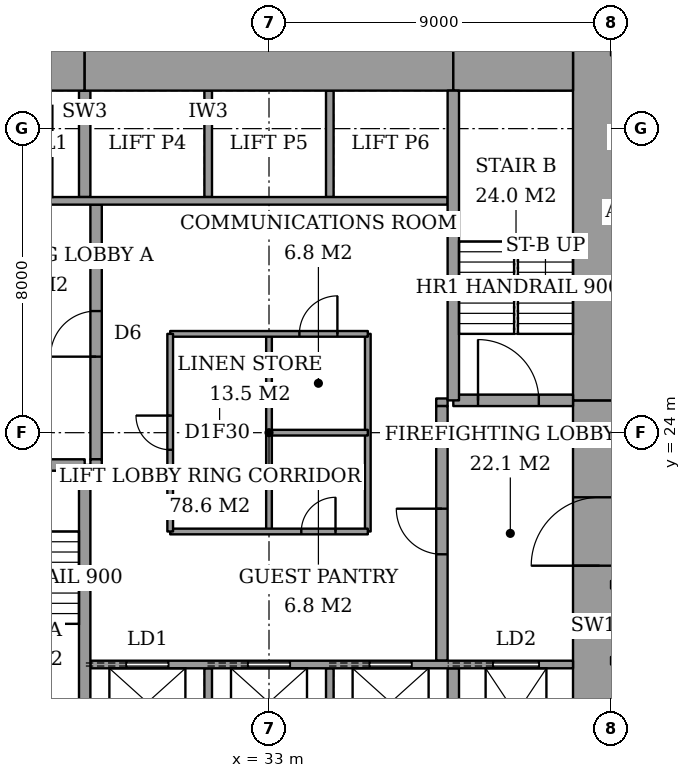
"""IFC4 building model, lengths in metres.
Left out: names, types, materials, properties, quantities, classifications, styles, units other than length and angle.
Written with IfcOpenShell. Run it as: python <this file> out.ifc"""

import sys

from ifc_helpers import new_model, si_unit, direction, frame, frame_2d, origin, place, context, subcontext, project, spatial, rectangle, extrude, element, fill, save


model = new_model("IFC4")
c1 = context("Model", 3, precision=1e-05, world=origin(), true_north=direction((0.0, 1.0)))
c2 = subcontext(c1, "Body", "Model", "MODEL_VIEW")
j1 = project(units=[si_unit("LENGTHUNIT", "METRE"), si_unit("PLANEANGLEUNIT", "RADIAN")], contexts=[c1])
p1 = place(None, origin())
s1 = spatial("IfcSite", under=j1, at=p1, CompositionType="ELEMENT")
p2 = place(p1, origin())
s2 = spatial("IfcBuilding", under=s1, at=p2, CompositionType="ELEMENT")
p3 = place(p2, frame((0.0, 0.0, 132.2)))
s3 = spatial("IfcBuildingStorey", under=s2, at=p3, CompositionType="ELEMENT", Elevation=132.2)
p4 = place(p3, frame((25.0, 34.0, 0.0), z_axis=(0.0, 0.0, 1.0), x_axis=(1.0, 0.0, 0.0)))
e1 = element("IfcWall", 1, at=p4, inside=s3, PredefinedType="SHEAR", context=c2, shape_type="SweptSolid", body=[
    extrude(rectangle(XDim=3.15, YDim=2.0, at=frame_2d((1.575, 0.0))), origin(), (0.0, 0.0, 1.0), 3.6),
])
p5 = place(p3, frame((28.15, 34.0, 0.0), z_axis=(0.0, 0.0, 1.0), x_axis=(1.0, 0.0, 0.0)))
e2 = element("IfcWall", 2, at=p5, inside=s3, PredefinedType="SHEAR", context=c2, shape_type="SweptSolid", body=[
    extrude(rectangle(XDim=9.7, YDim=2.0, at=frame_2d((4.85, 0.0))), origin(), (0.0, 0.0, 1.0), 3.6),
])
p6 = place(p3, frame((37.85, 34.0, 0.0), z_axis=(0.0, 0.0, 1.0), x_axis=(1.0, 0.0, 0.0)))
e3 = element("IfcWall", 3, at=p6, inside=s3, PredefinedType="SHEAR", context=c2, shape_type="SweptSolid", body=[
    extrude(rectangle(XDim=3.15, YDim=2.0, at=frame_2d((1.575, 0.0))), origin(), (0.0, 0.0, 1.0), 3.6),
])
p7 = place(p3, frame((41.7, 13.0, 0.0), z_axis=(0.0, 0.0, 1.0), x_axis=(0.0, 1.0, 0.0)))
e4 = element("IfcWall", 4, at=p7, inside=s3, PredefinedType="SHEAR", context=c2, shape_type="SweptSolid", body=[
    extrude(rectangle(XDim=11.85, YDim=1.4, at=frame_2d((5.925, 0.0))), origin(), (0.0, 0.0, 1.0), 3.6),
])
p8 = place(p7, frame((7.5, 0.0, 0.0)))
e5 = element("IfcOpeningElement", 5, at=p8, cuts=e4, PredefinedType="OPENING", context=c2, shape_type="SweptSolid", body=[
    extrude(rectangle(XDim=1.8, YDim=2.4, at=frame_2d((0.9, 1.2))), frame((0.0, 0.71, 0.0), z_axis=(0.0, -1.0, 0.0), x_axis=(1.0, 0.0, 0.0)), (0.0, 0.0, 1.0), 1.42),
])
p9 = place(p3, frame((41.7, 24.85, 0.0), z_axis=(0.0, 0.0, 1.0), x_axis=(0.0, 1.0, 0.0)))
e6 = element("IfcWall", 6, at=p9, inside=s3, PredefinedType="SHEAR", context=c2, shape_type="SweptSolid", body=[
    extrude(rectangle(XDim=10.15, YDim=1.4, at=frame_2d((5.075, 0.0))), origin(), (0.0, 0.0, 1.0), 3.6),
])
p10 = place(p3, frame((28.15, 15.0, 0.0), z_axis=(0.0, 0.0, 1.0), x_axis=(0.0, 1.0, 0.0)))
e7 = element("IfcWall", 7, at=p10, inside=s3, PredefinedType="SHEAR", context=c2, shape_type="SweptSolid", body=[
    extrude(rectangle(XDim=8.15, YDim=0.3, at=frame_2d((4.075, 0.0))), origin(), (0.0, 0.0, 1.0), 3.6),
])
p11 = place(p3, frame((25.0, 23.15, 0.0), z_axis=(0.0, 0.0, 1.0), x_axis=(1.0, 0.0, 0.0)))
e8 = element("IfcWall", 8, at=p11, inside=s3, PredefinedType="SHEAR", context=c2, shape_type="SweptSolid", body=[
    extrude(rectangle(XDim=3.15, YDim=0.3, at=frame_2d((1.575, 0.0))), origin(), (0.0, 0.0, 1.0), 3.6),
])
p12 = place(p11, frame((0.3, 0.0, 0.0)))
e9 = element("IfcOpeningElement", 9, at=p12, cuts=e8, PredefinedType="OPENING", context=c2, shape_type="SweptSolid", body=[
    extrude(rectangle(XDim=1.6, YDim=2.1, at=frame_2d((0.8, 1.05))), frame((0.0, 0.16, 0.0), z_axis=(0.0, -1.0, 0.0), x_axis=(1.0, 0.0, 0.0)), (0.0, 0.0, 1.0), 0.32),
])
p13 = place(p3, frame((37.85, 24.85, 0.0), z_axis=(0.0, 0.0, 1.0), x_axis=(0.0, 1.0, 0.0)))
e10 = element("IfcWall", 10, at=p13, inside=s3, PredefinedType="SHEAR", context=c2, shape_type="SweptSolid", body=[
    extrude(rectangle(XDim=8.15, YDim=0.3, at=frame_2d((4.075, 0.0))), origin(), (0.0, 0.0, 1.0), 3.6),
])
p14 = place(p3, frame((37.85, 24.85, 0.0), z_axis=(0.0, 0.0, 1.0), x_axis=(1.0, 0.0, 0.0)))
e11 = element("IfcWall", 11, at=p14, inside=s3, PredefinedType="SHEAR", context=c2, shape_type="SweptSolid", body=[
    extrude(rectangle(XDim=3.15, YDim=0.3, at=frame_2d((1.575, 0.0))), origin(), (0.0, 0.0, 1.0), 3.6),
])
p15 = place(p14, frame((0.65, 0.0, 0.0)))
e12 = element("IfcOpeningElement", 12, at=p15, cuts=e11, PredefinedType="OPENING", context=c2, shape_type="SweptSolid", body=[
    extrude(rectangle(XDim=1.6, YDim=2.1, at=frame_2d((0.8, 1.05))), frame((0.0, 0.16, 0.0), z_axis=(0.0, -1.0, 0.0), x_axis=(1.0, 0.0, 0.0)), (0.0, 0.0, 1.0), 0.32),
])
p16 = place(p3, frame((28.45, 23.3, 0.0), z_axis=(0.0, 0.0, 1.0), x_axis=(0.0, 1.0, 0.0)))
e13 = element("IfcWall", 13, at=p16, inside=s3, PredefinedType="PARTITIONING", context=c2, shape_type="SweptSolid", body=[
    extrude(rectangle(XDim=6.7, YDim=0.3, at=frame_2d((3.35, 0.0))), origin(), (0.0, 0.0, 1.0), 3.6),
])
p17 = place(p16, frame((2.7, 0.0, 0.0)))
e14 = element("IfcOpeningElement", 14, at=p17, cuts=e13, PredefinedType="OPENING", context=c2, shape_type="SweptSolid", body=[
    extrude(rectangle(XDim=1.2, YDim=2.1, at=frame_2d((0.6, 1.05))), frame((0.0, 0.16, 0.0), z_axis=(0.0, -1.0, 0.0), x_axis=(1.0, 0.0, 0.0)), (0.0, 0.0, 1.0), 0.32),
])
p18 = place(p3, frame((37.55, 18.0, 0.0), z_axis=(0.0, 0.0, 1.0), x_axis=(0.0, 1.0, 0.0)))
e15 = element("IfcWall", 15, at=p18, inside=s3, PredefinedType="PARTITIONING", context=c2, shape_type="SweptSolid", body=[
    extrude(rectangle(XDim=6.7, YDim=0.3, at=frame_2d((3.35, 0.0))), origin(), (0.0, 0.0, 1.0), 3.6),
])
p19 = place(p18, frame((2.8, 0.0, 0.0)))
e16 = element("IfcOpeningElement", 16, at=p19, cuts=e15, PredefinedType="OPENING", context=c2, shape_type="SweptSolid", body=[
    extrude(rectangle(XDim=1.2, YDim=2.1, at=frame_2d((0.6, 1.05))), frame((0.0, 0.16, 0.0), z_axis=(0.0, -1.0, 0.0), x_axis=(1.0, 0.0, 0.0)), (0.0, 0.0, 1.0), 0.32),
])
p20 = place(p3, frame((28.3, 17.9, 0.0), z_axis=(0.0, 0.0, 1.0), x_axis=(1.0, 0.0, 0.0)))
e17 = element("IfcWall", 17, at=p20, inside=s3, PredefinedType="PARTITIONING", context=c2, shape_type="SweptSolid", body=[
    extrude(rectangle(XDim=12.7, YDim=0.2, at=frame_2d((6.35, 0.0))), origin(), (0.0, 0.0, 1.0), 3.6),
])
p21 = place(p20, frame((0.95, 0.0, 0.0)))
e18 = element("IfcOpeningElement", 18, at=p21, cuts=e17, PredefinedType="OPENING", context=c2, shape_type="SweptSolid", body=[
    extrude(rectangle(XDim=1.1, YDim=2.1, at=frame_2d((0.55, 1.05))), frame((0.0, 0.11, 0.0), z_axis=(0.0, -1.0, 0.0), x_axis=(1.0, 0.0, 0.0)), (0.0, 0.0, 1.0), 0.22),
])
p22 = place(p20, frame((4.15, 0.0, 0.0)))
e19 = element("IfcOpeningElement", 19, at=p22, cuts=e17, PredefinedType="OPENING", context=c2, shape_type="SweptSolid", body=[
    extrude(rectangle(XDim=1.1, YDim=2.1, at=frame_2d((0.55, 1.05))), frame((0.0, 0.11, 0.0), z_axis=(0.0, -1.0, 0.0), x_axis=(1.0, 0.0, 0.0)), (0.0, 0.0, 1.0), 0.22),
])
p23 = place(p20, frame((7.35, 0.0, 0.0)))
e20 = element("IfcOpeningElement", 20, at=p23, cuts=e17, PredefinedType="OPENING", context=c2, shape_type="SweptSolid", body=[
    extrude(rectangle(XDim=1.1, YDim=2.1, at=frame_2d((0.55, 1.05))), frame((0.0, 0.11, 0.0), z_axis=(0.0, -1.0, 0.0), x_axis=(1.0, 0.0, 0.0)), (0.0, 0.0, 1.0), 0.22),
])
p24 = place(p20, frame((10.6, 0.0, 0.0)))
e21 = element("IfcOpeningElement", 21, at=p24, cuts=e17, PredefinedType="OPENING", context=c2, shape_type="SweptSolid", body=[
    extrude(rectangle(XDim=1.2, YDim=2.1, at=frame_2d((0.6, 1.05))), frame((0.0, 0.11, 0.0), z_axis=(0.0, -1.0, 0.0), x_axis=(1.0, 0.0, 0.0)), (0.0, 0.0, 1.0), 0.22),
])
p25 = place(p3, frame((25.0, 30.1, 0.0), z_axis=(0.0, 0.0, 1.0), x_axis=(1.0, 0.0, 0.0)))
e22 = element("IfcWall", 22, at=p25, inside=s3, PredefinedType="PARTITIONING", context=c2, shape_type="SweptSolid", body=[
    extrude(rectangle(XDim=12.7, YDim=0.2, at=frame_2d((6.35, 0.0))), origin(), (0.0, 0.0, 1.0), 3.6),
])
p26 = place(p25, frame((0.9, 0.0, 0.0)))
e23 = element("IfcOpeningElement", 23, at=p26, cuts=e22, PredefinedType="OPENING", context=c2, shape_type="SweptSolid", body=[
    extrude(rectangle(XDim=1.2, YDim=2.1, at=frame_2d((0.6, 1.05))), frame((0.0, 0.11, 0.0), z_axis=(0.0, -1.0, 0.0), x_axis=(1.0, 0.0, 0.0)), (0.0, 0.0, 1.0), 0.22),
])
for number, where, z_axis, x_axis in (
    (24, (31.4, 15.0, 0.0), (0.0, 0.0, 1.0), (0.0, 1.0, 0.0)),
    (25, (34.6, 15.0, 0.0), (0.0, 0.0, 1.0), (0.0, 1.0, 0.0)),
):
    element("IfcWall", number, at=place(p3, frame(where, z_axis=z_axis, x_axis=x_axis)), inside=s3, PredefinedType="PARTITIONING", context=c2, shape_type="SweptSolid", body=[
        extrude(rectangle(XDim=2.8, YDim=0.2, at=frame_2d((1.4, 0.0))), origin(), (0.0, 0.0, 1.0), 3.6),
    ])
p27 = place(p3, frame((37.85, 15.0, 0.0), z_axis=(0.0, 0.0, 1.0), x_axis=(0.0, 1.0, 0.0)))
e26 = element("IfcWall", 26, at=p27, inside=s3, PredefinedType="SHEAR", context=c2, shape_type="SweptSolid", body=[
    extrude(rectangle(XDim=2.8, YDim=0.3, at=frame_2d((1.4, 0.0))), origin(), (0.0, 0.0, 1.0), 3.6),
])
for number, where, z_axis, x_axis in (
    (27, (31.4, 30.2, 0.0), (0.0, 0.0, 1.0), (0.0, 1.0, 0.0)),
    (28, (34.6, 30.2, 0.0), (0.0, 0.0, 1.0), (0.0, 1.0, 0.0)),
):
    element("IfcWall", number, at=place(p3, frame(where, z_axis=z_axis, x_axis=x_axis)), inside=s3, PredefinedType="PARTITIONING", context=c2, shape_type="SweptSolid", body=[
        extrude(rectangle(XDim=2.8, YDim=0.2, at=frame_2d((1.4, 0.0))), origin(), (0.0, 0.0, 1.0), 3.6),
    ])
p28 = place(p3, frame((28.15, 30.2, 0.0), z_axis=(0.0, 0.0, 1.0), x_axis=(0.0, 1.0, 0.0)))
e29 = element("IfcWall", 29, at=p28, inside=s3, PredefinedType="SHEAR", context=c2, shape_type="SweptSolid", body=[
    extrude(rectangle(XDim=2.8, YDim=0.3, at=frame_2d((1.4, 0.0))), origin(), (0.0, 0.0, 1.0), 3.6),
])
for number, where, z_axis, x_axis in (
    (30, (28.3, 23.2, 0.0), (0.0, 0.0, 1.0), (1.0, 0.0, 0.0)),
    (31, (37.4, 24.8, 0.0), (0.0, 0.0, 1.0), (1.0, 0.0, 0.0)),
):
    element("IfcWall", number, at=place(p3, frame(where, z_axis=z_axis, x_axis=x_axis)), inside=s3, PredefinedType="PARTITIONING", context=c2, shape_type="SweptSolid", body=[
        extrude(rectangle(XDim=0.3, YDim=0.2, at=frame_2d((0.15, 0.0))), origin(), (0.0, 0.0, 1.0), 3.6),
    ])
p29 = place(p3, frame((30.4, 21.4, 0.0), z_axis=(0.0, 0.0, 1.0), x_axis=(1.0, 0.0, 0.0)))
e32 = element("IfcWall", 32, at=p29, inside=s3, PredefinedType="PARTITIONING", context=c2, shape_type="SweptSolid", body=[
    extrude(rectangle(XDim=5.2, YDim=0.15, at=frame_2d((2.6, 0.0))), origin(), (0.0, 0.0, 1.0), 3.35),
])
p30 = place(p29, frame((3.45, 0.0, 0.0)))
e33 = element("IfcOpeningElement", 33, at=p30, cuts=e32, PredefinedType="OPENING", context=c2, shape_type="SweptSolid", body=[
    extrude(rectangle(XDim=0.9, YDim=2.1, at=frame_2d((0.45, 1.05))), frame((0.0, 0.085, 0.0), z_axis=(0.0, -1.0, 0.0), x_axis=(1.0, 0.0, 0.0)), (0.0, 0.0, 1.0), 0.17),
])
p31 = place(p3, frame((30.4, 26.6, 0.0), z_axis=(0.0, 0.0, 1.0), x_axis=(1.0, 0.0, 0.0)))
e34 = element("IfcWall", 34, at=p31, inside=s3, PredefinedType="PARTITIONING", context=c2, shape_type="SweptSolid", body=[
    extrude(rectangle(XDim=5.2, YDim=0.15, at=frame_2d((2.6, 0.0))), origin(), (0.0, 0.0, 1.0), 3.35),
])
p32 = place(p31, frame((3.4, 0.0, 0.0)))
e35 = element("IfcOpeningElement", 35, at=p32, cuts=e34, PredefinedType="OPENING", context=c2, shape_type="SweptSolid", body=[
    extrude(rectangle(XDim=1.0, YDim=2.1, at=frame_2d((0.5, 1.05))), frame((0.0, 0.085, 0.0), z_axis=(0.0, -1.0, 0.0), x_axis=(1.0, 0.0, 0.0)), (0.0, 0.0, 1.0), 0.17),
])
p33 = place(p3, frame((30.4, 21.4, 0.0), z_axis=(0.0, 0.0, 1.0), x_axis=(0.0, 1.0, 0.0)))
e36 = element("IfcWall", 36, at=p33, inside=s3, PredefinedType="PARTITIONING", context=c2, shape_type="SweptSolid", body=[
    extrude(rectangle(XDim=5.2, YDim=0.15, at=frame_2d((2.6, 0.0))), origin(), (0.0, 0.0, 1.0), 3.35),
])
p34 = place(p33, frame((2.15, 0.0, 0.0)))
e37 = element("IfcOpeningElement", 37, at=p34, cuts=e36, PredefinedType="OPENING", context=c2, shape_type="SweptSolid", body=[
    extrude(rectangle(XDim=0.9, YDim=2.1, at=frame_2d((0.45, 1.05))), frame((0.0, 0.085, 0.0), z_axis=(0.0, -1.0, 0.0), x_axis=(1.0, 0.0, 0.0)), (0.0, 0.0, 1.0), 0.17),
])
p35 = place(p3, frame((35.6, 21.4, 0.0), z_axis=(0.0, 0.0, 1.0), x_axis=(0.0, 1.0, 0.0)))
e38 = element("IfcWall", 38, at=p35, inside=s3, PredefinedType="PARTITIONING", context=c2, shape_type="SweptSolid", body=[
    extrude(rectangle(XDim=5.2, YDim=0.15, at=frame_2d((2.6, 0.0))), origin(), (0.0, 0.0, 1.0), 3.35),
])
p36 = place(p3, frame((33.0, 24.0, 0.0), z_axis=(0.0, 0.0, 1.0), x_axis=(1.0, 0.0, 0.0)))
e39 = element("IfcWall", 39, at=p36, inside=s3, PredefinedType="PARTITIONING", context=c2, shape_type="SweptSolid", body=[
    extrude(rectangle(XDim=2.6, YDim=0.15, at=frame_2d((1.3, 0.0))), origin(), (0.0, 0.0, 1.0), 3.35),
])
p37 = place(p3, frame((33.0, 21.4, 0.0), z_axis=(0.0, 0.0, 1.0), x_axis=(0.0, 1.0, 0.0)))
e40 = element("IfcWall", 40, at=p37, inside=s3, PredefinedType="PARTITIONING", context=c2, shape_type="SweptSolid", body=[
    extrude(rectangle(XDim=5.2, YDim=0.15, at=frame_2d((2.6, 0.0))), origin(), (0.0, 0.0, 1.0), 3.35),
])
p38 = place(p15, origin())
e41 = element("IfcDoor", 41, at=p38, inside=s3, OperationType="DOUBLE_DOOR_SINGLE_SWING", PredefinedType="DOOR", context=c2, shape_type="SweptSolid", body=[
    extrude(rectangle(XDim=1.6, YDim=2.1, at=frame_2d((0.8, 1.05))), frame((0.0, 0.025, 0.0), z_axis=(0.0, -1.0, 0.0), x_axis=(1.0, 0.0, 0.0)), (0.0, 0.0, 1.0), 0.05),
])
fill(e12, e41)
p39 = place(p17, origin())
e42 = element("IfcDoor", 42, at=p39, inside=s3, OperationType="SINGLE_SWING_RIGHT", PredefinedType="DOOR", context=c2, shape_type="SweptSolid", body=[
    extrude(rectangle(XDim=1.2, YDim=2.1, at=frame_2d((0.6, 1.05))), frame((0.0, 0.025, 0.0), z_axis=(0.0, -1.0, 0.0), x_axis=(1.0, 0.0, 0.0)), (0.0, 0.0, 1.0), 0.05),
])
fill(e14, e42)
p40 = place(p19, origin())
e43 = element("IfcDoor", 43, at=p40, inside=s3, OperationType="SINGLE_SWING_LEFT", PredefinedType="DOOR", context=c2, shape_type="SweptSolid", body=[
    extrude(rectangle(XDim=1.2, YDim=2.1, at=frame_2d((0.6, 1.05))), frame((0.0, 0.025, 0.0), z_axis=(0.0, -1.0, 0.0), x_axis=(1.0, 0.0, 0.0)), (0.0, 0.0, 1.0), 0.05),
])
fill(e16, e43)
p41 = place(p8, origin())
e44 = element("IfcDoor", 44, at=p41, inside=s3, OperationType="DOUBLE_DOOR_DOUBLE_SWING", PredefinedType="DOOR", context=c2, shape_type="SweptSolid", body=[
    extrude(rectangle(XDim=1.8, YDim=2.4, at=frame_2d((0.9, 1.2))), frame((0.0, 0.025, 0.0), z_axis=(0.0, -1.0, 0.0), x_axis=(1.0, 0.0, 0.0)), (0.0, 0.0, 1.0), 0.05),
])
fill(e5, e44)
p42 = place(p34, origin())
e45 = element("IfcDoor", 45, at=p42, inside=s3, OperationType="SINGLE_SWING_LEFT", PredefinedType="DOOR", context=c2, shape_type="SweptSolid", body=[
    extrude(rectangle(XDim=0.9, YDim=2.1, at=frame_2d((0.45, 1.05))), frame((0.0, 0.025, 0.0), z_axis=(0.0, -1.0, 0.0), x_axis=(1.0, 0.0, 0.0)), (0.0, 0.0, 1.0), 0.05),
])
fill(e37, e45)
p43 = place(p30, origin())
e46 = element("IfcDoor", 46, at=p43, inside=s3, OperationType="SINGLE_SWING_LEFT", PredefinedType="DOOR", context=c2, shape_type="SweptSolid", body=[
    extrude(rectangle(XDim=0.9, YDim=2.1, at=frame_2d((0.45, 1.05))), frame((0.0, 0.025, 0.0), z_axis=(0.0, -1.0, 0.0), x_axis=(1.0, 0.0, 0.0)), (0.0, 0.0, 1.0), 0.05),
])
fill(e33, e46)
p44 = place(p32, origin())
e47 = element("IfcDoor", 47, at=p44, inside=s3, OperationType="SINGLE_SWING_LEFT", PredefinedType="DOOR", context=c2, shape_type="SweptSolid", body=[
    extrude(rectangle(XDim=1.0, YDim=2.1, at=frame_2d((0.5, 1.05))), frame((0.0, 0.025, 0.0), z_axis=(0.0, -1.0, 0.0), x_axis=(1.0, 0.0, 0.0)), (0.0, 0.0, 1.0), 0.05),
])
fill(e35, e47)
p45 = place(p21, origin())
e48 = element("IfcDoor", 48, at=p45, inside=s3, OperationType="SLIDING_TO_LEFT", PredefinedType="DOOR", context=c2, shape_type="SweptSolid", body=[
    extrude(rectangle(XDim=1.1, YDim=2.1, at=frame_2d((0.55, 1.05))), frame((0.0, 0.025, 0.0), z_axis=(0.0, -1.0, 0.0), x_axis=(1.0, 0.0, 0.0)), (0.0, 0.0, 1.0), 0.05),
])
fill(e18, e48)
p46 = place(p22, origin())
e49 = element("IfcDoor", 49, at=p46, inside=s3, OperationType="SLIDING_TO_LEFT", PredefinedType="DOOR", context=c2, shape_type="SweptSolid", body=[
    extrude(rectangle(XDim=1.1, YDim=2.1, at=frame_2d((0.55, 1.05))), frame((0.0, 0.025, 0.0), z_axis=(0.0, -1.0, 0.0), x_axis=(1.0, 0.0, 0.0)), (0.0, 0.0, 1.0), 0.05),
])
fill(e19, e49)
p47 = place(p23, origin())
e50 = element("IfcDoor", 50, at=p47, inside=s3, OperationType="SLIDING_TO_LEFT", PredefinedType="DOOR", context=c2, shape_type="SweptSolid", body=[
    extrude(rectangle(XDim=1.1, YDim=2.1, at=frame_2d((0.55, 1.05))), frame((0.0, 0.025, 0.0), z_axis=(0.0, -1.0, 0.0), x_axis=(1.0, 0.0, 0.0)), (0.0, 0.0, 1.0), 0.05),
])
fill(e20, e50)
p48 = place(p24, origin())
e51 = element("IfcDoor", 51, at=p48, inside=s3, OperationType="SLIDING_TO_LEFT", PredefinedType="DOOR", context=c2, shape_type="SweptSolid", body=[
    extrude(rectangle(XDim=1.2, YDim=2.1, at=frame_2d((0.6, 1.05))), frame((0.0, 0.025, 0.0), z_axis=(0.0, -1.0, 0.0), x_axis=(1.0, 0.0, 0.0)), (0.0, 0.0, 1.0), 0.05),
])
fill(e21, e51)
save(model, sys.argv[1])
